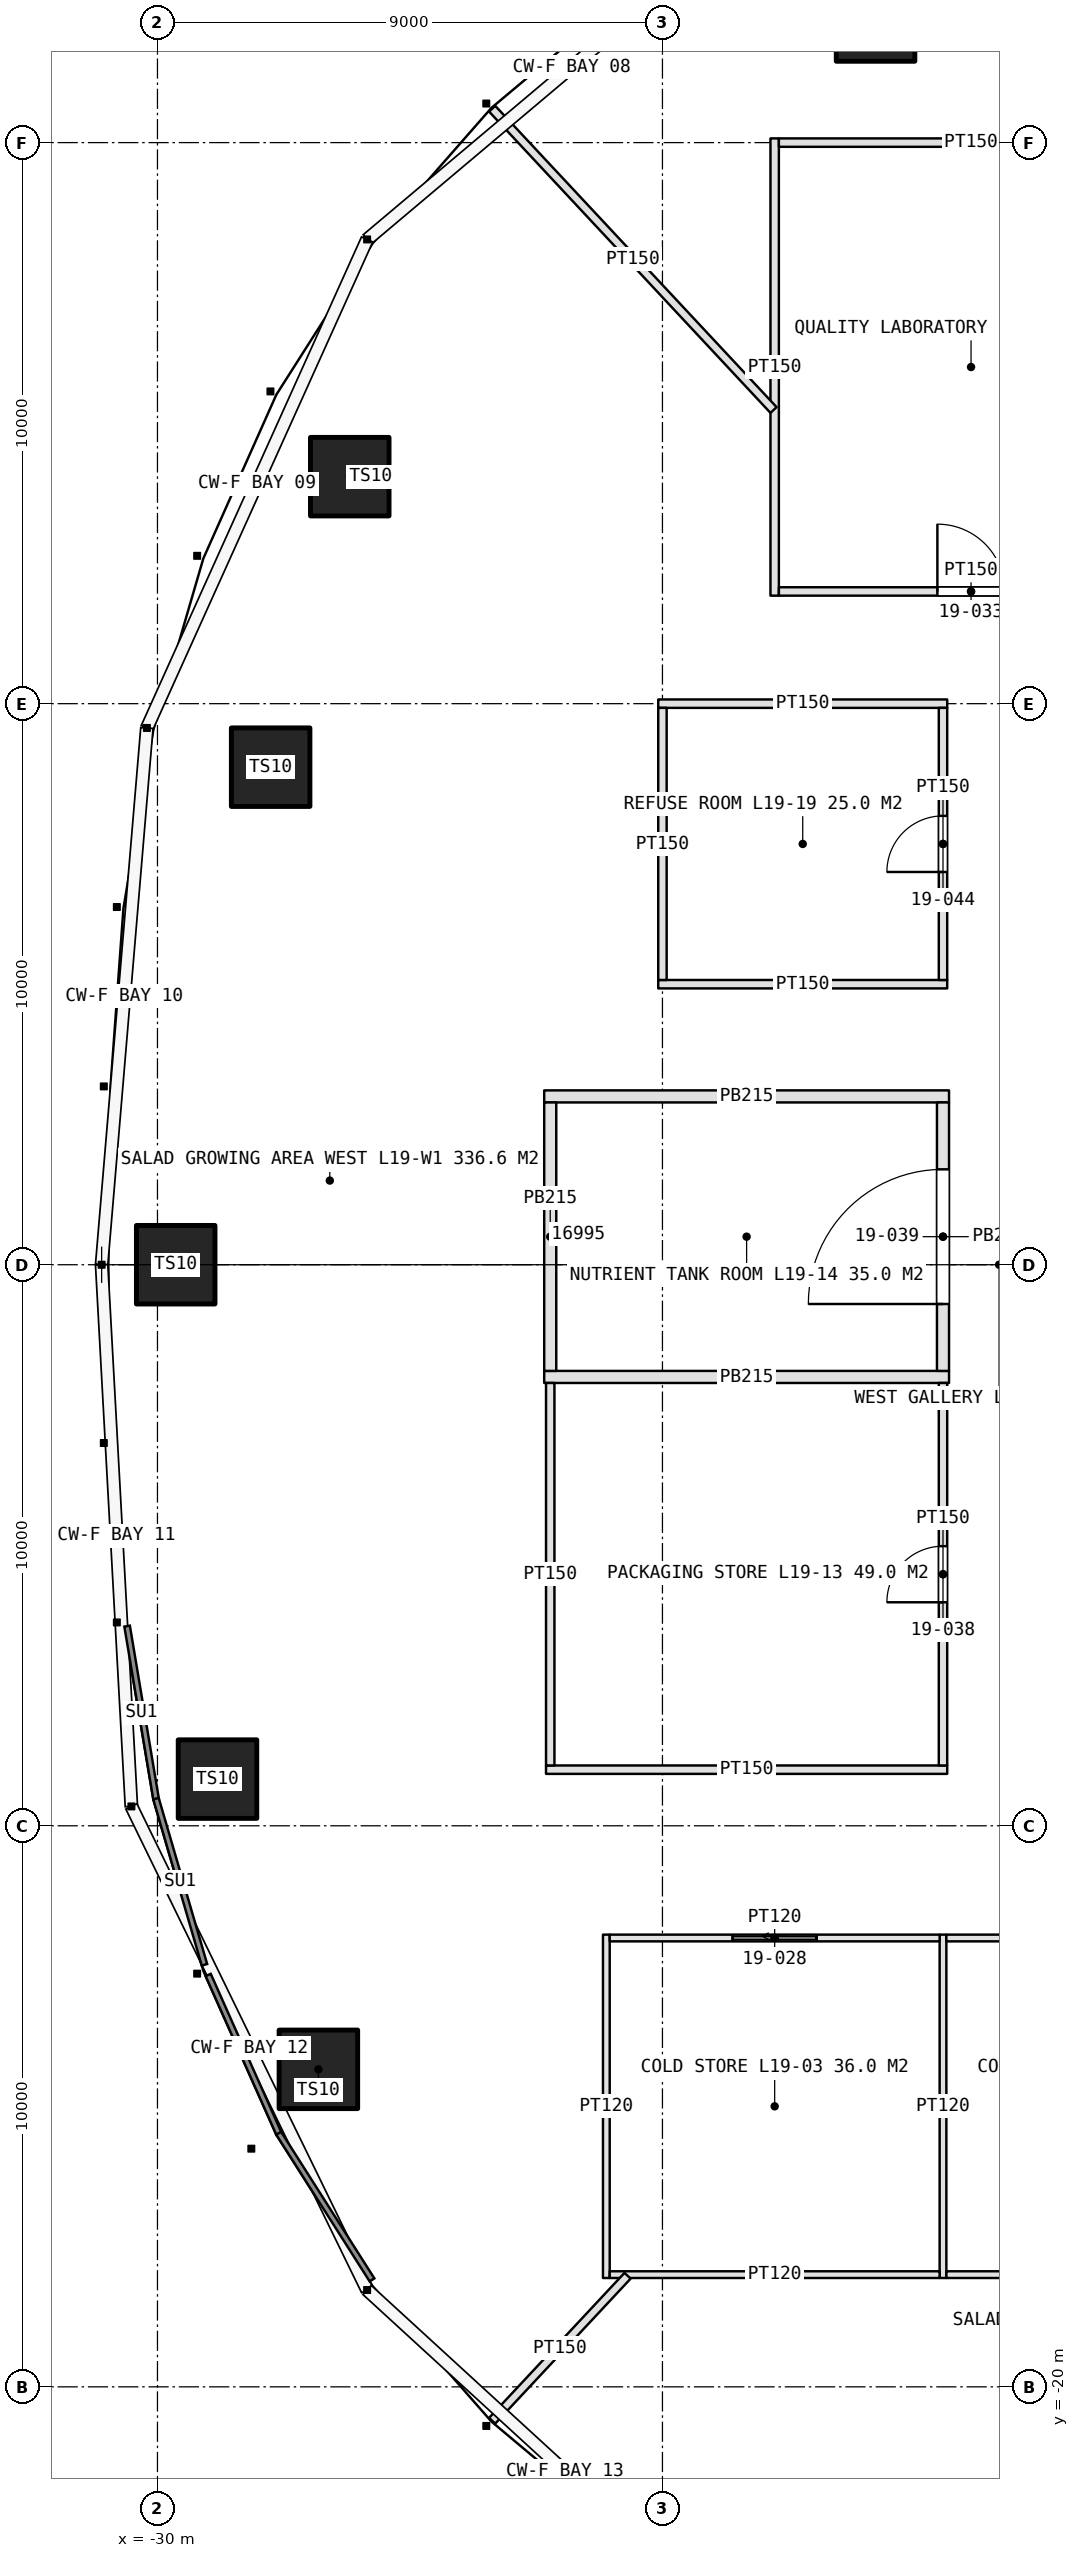
"""IFC4 building model, lengths in metres.
Left out: names, types, materials, properties, quantities, classifications, styles, units other than length and angle.
Written with IfcOpenShell. Run it as: python <this file> out.ifc"""

import sys

from ifc_helpers import new_model, si_unit, direction, frame, frame_2d, origin, origin_2d, place, context, subcontext, project, spatial, rectangle, hollow_rectangle, extrude, element, fill, save


model = new_model("IFC4")
c1 = context("Model", 3, precision=1e-05, world=origin(), true_north=direction((0.0, 1.0)))
c2 = subcontext(c1, "Body", "Model", "MODEL_VIEW")
j1 = project(units=[si_unit("LENGTHUNIT", "METRE"), si_unit("PLANEANGLEUNIT", "RADIAN")], contexts=[c1])
p1 = place(None, origin())
s1 = spatial("IfcSite", under=j1, at=p1, CompositionType="ELEMENT")
p2 = place(p1, origin())
s2 = spatial("IfcBuilding", under=s1, at=p2, CompositionType="ELEMENT")
p3 = place(p2, frame((0.0, 0.0, 95.0)))
s3 = spatial("IfcBuildingStorey", under=s2, at=p3, CompositionType="ELEMENT", Elevation=95.0)
for number, where, z_axis, x_axis in (
    (1, (-17.202, 22.15, 0.0), (0.0, 0.0, 1.0), (1.0, 0.0, 0.0)),
    (2, (-26.573, 14.046, 0.0), (0.0, 0.0, 1.0), (1.0, 0.0, 0.0)),
    (3, (-27.983, 8.868, 0.0), (0.0, 0.0, 1.0), (1.0, 0.0, 0.0)),
):
    element("IfcColumn", number, at=place(p3, frame(where, z_axis=z_axis, x_axis=x_axis)), inside=s3, PredefinedType="COLUMN", context=c2, shape_type="SweptSolid", body=[
        extrude(hollow_rectangle(XDim=1.4, YDim=1.4, WallThickness=0.15, at=origin_2d()), origin(), (0.0, 0.0, 1.0), 5.0),
    ])
for number, where, z_axis, x_axis in (
    (4, (-29.675, 0.0, 0.0), (0.0, 0.0, 1.0), (1.0, 0.0, 0.0)),
    (5, (-28.93, -9.168, 0.0), (0.0, 0.0, 1.0), (1.0, 0.0, 0.0)),
    (6, (-27.132, -14.341, 0.0), (0.0, 0.0, 1.0), (1.0, 0.0, 0.0)),
):
    element("IfcColumn", number, at=place(p3, frame(where, z_axis=z_axis, x_axis=x_axis)), inside=s3, PredefinedType="COLUMN", context=c2, shape_type="SweptSolid", body=[
        extrude(hollow_rectangle(XDim=1.4, YDim=1.4, WallThickness=0.15, at=origin_2d()), origin(), (0.0, 0.0, 1.0), 4.025),
    ])
for number, where, z_axis, x_axis in (
    (7, (-22.0, -11.94, 0.0), (0.0, 0.0, 1.0), (0.0, -1.0, 0.0)),
    (8, (-16.0, -11.94, 0.0), (0.0, 0.0, 1.0), (0.0, -1.0, 0.0)),
):
    element("IfcWall", number, at=place(p3, frame(where, z_axis=z_axis, x_axis=x_axis)), inside=s3, PredefinedType="PARTITIONING", context=c2, shape_type="SweptSolid", body=[
        extrude(rectangle(XDim=6.12, YDim=0.12, at=frame_2d((3.06, 0.0))), origin(), (0.0, 0.0, 1.0), 3.6),
    ])
p4 = place(p3, frame((-21.94, -12.0, 0.0), z_axis=(0.0, 0.0, 1.0), x_axis=(1.0, 0.0, 0.0)))
e9 = element("IfcWall", 9, at=p4, inside=s3, PredefinedType="PARTITIONING", context=c2, shape_type="SweptSolid", body=[
    extrude(rectangle(XDim=5.88, YDim=0.12, at=frame_2d((2.94, 0.0))), origin(), (0.0, 0.0, 1.0), 3.6),
])
p5 = place(p4, frame((2.19, 0.0, 0.0)))
e10 = element("IfcOpeningElement", 10, at=p5, cuts=e9, PredefinedType="OPENING", context=c2, shape_type="SweptSolid", body=[
    extrude(rectangle(XDim=1.5, YDim=2.5, at=frame_2d((0.75, 1.25))), frame((0.0, 0.07, 0.0), z_axis=(0.0, -1.0, 0.0), x_axis=(1.0, 0.0, 0.0)), (0.0, 0.0, 1.0), 0.14),
])
p6 = place(p3, frame((-21.94, -18.0, 0.0), z_axis=(0.0, 0.0, 1.0), x_axis=(1.0, 0.0, 0.0)))
e11 = element("IfcWall", 11, at=p6, inside=s3, PredefinedType="PARTITIONING", context=c2, shape_type="SweptSolid", body=[
    extrude(rectangle(XDim=5.88, YDim=0.12, at=frame_2d((2.94, 0.0))), origin(), (0.0, 0.0, 1.0), 3.6),
])
p7 = place(p3, frame((-15.94, -12.0, 0.0), z_axis=(0.0, 0.0, 1.0), x_axis=(1.0, 0.0, 0.0)))
e12 = element("IfcWall", 12, at=p7, inside=s3, PredefinedType="PARTITIONING", context=c2, shape_type="SweptSolid", body=[
    extrude(rectangle(XDim=5.88, YDim=0.12, at=frame_2d((2.94, 0.0))), origin(), (0.0, 0.0, 1.0), 3.6),
])
p8 = place(p7, frame((2.19, 0.0, 0.0)))
e13 = element("IfcOpeningElement", 13, at=p8, cuts=e12, PredefinedType="OPENING", context=c2, shape_type="SweptSolid", body=[
    extrude(rectangle(XDim=1.5, YDim=2.5, at=frame_2d((0.75, 1.25))), frame((0.0, 0.07, 0.0), z_axis=(0.0, -1.0, 0.0), x_axis=(1.0, 0.0, 0.0)), (0.0, 0.0, 1.0), 0.14),
])
p9 = place(p3, frame((-15.94, -18.0, 0.0), z_axis=(0.0, 0.0, 1.0), x_axis=(1.0, 0.0, 0.0)))
e14 = element("IfcWall", 14, at=p9, inside=s3, PredefinedType="PARTITIONING", context=c2, shape_type="SweptSolid", body=[
    extrude(rectangle(XDim=5.88, YDim=0.12, at=frame_2d((2.94, 0.0))), origin(), (0.0, 0.0, 1.0), 3.6),
])
p10 = place(p3, frame((-19.0, 11.925, 0.0), z_axis=(0.0, 0.0, 1.0), x_axis=(0.0, 1.0, 0.0)))
e15 = element("IfcWall", 15, at=p10, inside=s3, PredefinedType="PARTITIONING", context=c2, shape_type="SweptSolid", body=[
    extrude(rectangle(XDim=8.15, YDim=0.15, at=frame_2d((4.075, 0.0))), origin(), (0.0, 0.0, 1.0), 3.6),
])
p11 = place(p3, frame((-18.925, 12.0, 0.0), z_axis=(0.0, 0.0, 1.0), x_axis=(1.0, 0.0, 0.0)))
e16 = element("IfcWall", 16, at=p11, inside=s3, PredefinedType="PARTITIONING", context=c2, shape_type="SweptSolid", body=[
    extrude(rectangle(XDim=6.85, YDim=0.15, at=frame_2d((3.425, 0.0))), origin(), (0.0, 0.0, 1.0), 3.6),
])
p12 = place(p11, frame((2.825, 0.0, 0.0)))
e17 = element("IfcOpeningElement", 17, at=p12, cuts=e16, PredefinedType="OPENING", context=c2, shape_type="SweptSolid", body=[
    extrude(rectangle(XDim=1.2, YDim=2.3, at=frame_2d((0.6, 1.15))), frame((0.0, 0.085, 0.0), z_axis=(0.0, -1.0, 0.0), x_axis=(1.0, 0.0, 0.0)), (0.0, 0.0, 1.0), 0.17),
])
p13 = place(p3, frame((-18.925, 20.0, 0.0), z_axis=(0.0, 0.0, 1.0), x_axis=(1.0, 0.0, 0.0)))
e18 = element("IfcWall", 18, at=p13, inside=s3, PredefinedType="PARTITIONING", context=c2, shape_type="SweptSolid", body=[
    extrude(rectangle(XDim=6.85, YDim=0.15, at=frame_2d((3.425, 0.0))), origin(), (0.0, 0.0, 1.0), 3.6),
])
p14 = place(p3, frame((-15.925, -9.0, 0.0), z_axis=(0.0, 0.0, 1.0), x_axis=(-1.0, 0.0, 0.0)))
e19 = element("IfcWall", 19, at=p14, inside=s3, PredefinedType="PARTITIONING", context=c2, shape_type="SweptSolid", body=[
    extrude(rectangle(XDim=7.15, YDim=0.15, at=frame_2d((3.575, 0.0))), origin(), (0.0, 0.0, 1.0), 3.6),
])
for number, where, z_axis, x_axis in (
    (20, (-15.893, -2.0, 0.0), (0.0, 0.0, 1.0), (-1.0, 0.0, 0.0)),
    (21, (-15.893, 3.0, 0.0), (0.0, 0.0, 1.0), (-1.0, 0.0, 0.0)),
):
    element("IfcWall", number, at=place(p3, frame(where, z_axis=z_axis, x_axis=x_axis)), inside=s3, PredefinedType="PARTITIONING", context=c2, shape_type="SweptSolid", body=[
        extrude(rectangle(XDim=7.215, YDim=0.215, at=frame_2d((3.607, 0.0))), origin(), (0.0, 0.0, 1.0), 3.6),
    ])
p15 = place(p3, frame((-16.0, -8.925, 0.0), z_axis=(0.0, 0.0, 1.0), x_axis=(0.0, 1.0, 0.0)))
e22 = element("IfcWall", 22, at=p15, inside=s3, PredefinedType="PARTITIONING", context=c2, shape_type="SweptSolid", body=[
    extrude(rectangle(XDim=6.818, YDim=0.15, at=frame_2d((3.409, 0.0))), origin(), (0.0, 0.0, 1.0), 3.6),
])
p16 = place(p15, frame((2.909, 0.0, 0.0)))
e23 = element("IfcOpeningElement", 23, at=p16, cuts=e22, PredefinedType="OPENING", context=c2, shape_type="SweptSolid", body=[
    extrude(rectangle(XDim=1.0, YDim=2.2, at=frame_2d((0.5, 1.1))), frame((0.0, 0.085, 0.0), z_axis=(0.0, -1.0, 0.0), x_axis=(1.0, 0.0, 0.0)), (0.0, 0.0, 1.0), 0.17),
])
p17 = place(p3, frame((-23.0, -8.925, 0.0), z_axis=(0.0, 0.0, 1.0), x_axis=(0.0, 1.0, 0.0)))
e24 = element("IfcWall", 24, at=p17, inside=s3, PredefinedType="PARTITIONING", context=c2, shape_type="SweptSolid", body=[
    extrude(rectangle(XDim=6.818, YDim=0.15, at=frame_2d((3.409, 0.0))), origin(), (0.0, 0.0, 1.0), 3.6),
])
p18 = place(p3, frame((-16.0, -1.893, 0.0), z_axis=(0.0, 0.0, 1.0), x_axis=(0.0, 1.0, 0.0)))
e25 = element("IfcWall", 25, at=p18, inside=s3, PredefinedType="PARTITIONING", context=c2, shape_type="SweptSolid", body=[
    extrude(rectangle(XDim=4.785, YDim=0.215, at=frame_2d((2.393, 0.0))), origin(), (0.0, 0.0, 1.0), 3.6),
])
p19 = place(p18, frame((1.192, 0.0, 0.0)))
e26 = element("IfcOpeningElement", 26, at=p19, cuts=e25, PredefinedType="OPENING", context=c2, shape_type="SweptSolid", body=[
    extrude(rectangle(XDim=2.4, YDim=2.4, at=frame_2d((1.2, 1.2))), frame((0.0, 0.118, 0.0), z_axis=(0.0, -1.0, 0.0), x_axis=(1.0, 0.0, 0.0)), (0.0, 0.0, 1.0), 0.235),
])
p20 = place(p3, frame((-23.0, -1.893, 0.0), z_axis=(0.0, 0.0, 1.0), x_axis=(0.0, 1.0, 0.0)))
e27 = element("IfcWall", 27, at=p20, inside=s3, PredefinedType="PARTITIONING", context=c2, shape_type="SweptSolid", body=[
    extrude(rectangle(XDim=4.785, YDim=0.215, at=frame_2d((2.393, 0.0))), origin(), (0.0, 0.0, 1.0), 3.6),
])
for number, where, z_axis, x_axis in (
    (28, (-15.925, 5.0, 0.0), (0.0, 0.0, 1.0), (-1.0, 0.0, 0.0)),
    (29, (-15.925, 10.0, 0.0), (0.0, 0.0, 1.0), (-1.0, 0.0, 0.0)),
):
    element("IfcWall", number, at=place(p3, frame(where, z_axis=z_axis, x_axis=x_axis)), inside=s3, PredefinedType="PARTITIONING", context=c2, shape_type="SweptSolid", body=[
        extrude(rectangle(XDim=5.15, YDim=0.15, at=frame_2d((2.575, 0.0))), origin(), (0.0, 0.0, 1.0), 3.6),
    ])
p21 = place(p3, frame((-16.0, 5.075, 0.0), z_axis=(0.0, 0.0, 1.0), x_axis=(0.0, 1.0, 0.0)))
e30 = element("IfcWall", 30, at=p21, inside=s3, PredefinedType="PARTITIONING", context=c2, shape_type="SweptSolid", body=[
    extrude(rectangle(XDim=4.85, YDim=0.15, at=frame_2d((2.425, 0.0))), origin(), (0.0, 0.0, 1.0), 3.6),
])
p22 = place(p21, frame((1.925, 0.0, 0.0)))
e31 = element("IfcOpeningElement", 31, at=p22, cuts=e30, PredefinedType="OPENING", context=c2, shape_type="SweptSolid", body=[
    extrude(rectangle(XDim=1.0, YDim=2.2, at=frame_2d((0.5, 1.1))), frame((0.0, 0.085, 0.0), z_axis=(0.0, -1.0, 0.0), x_axis=(1.0, 0.0, 0.0)), (0.0, 0.0, 1.0), 0.17),
])
p23 = place(p3, frame((-21.0, 5.075, 0.0), z_axis=(0.0, 0.0, 1.0), x_axis=(0.0, 1.0, 0.0)))
e32 = element("IfcWall", 32, at=p23, inside=s3, PredefinedType="PARTITIONING", context=c2, shape_type="SweptSolid", body=[
    extrude(rectangle(XDim=4.85, YDim=0.15, at=frame_2d((2.425, 0.0))), origin(), (0.0, 0.0, 1.0), 3.6),
])
p24 = place(p3, frame((-21.622, -18.02, 0.0), z_axis=(0.0, 0.0, 1.0), x_axis=(-0.682522451791, -0.730864626864, 0.0)))
e33 = element("IfcWall", 33, at=p24, inside=s3, PredefinedType="PARTITIONING", context=c2, shape_type="SweptSolid", body=[
    extrude(rectangle(XDim=3.535, YDim=0.15, at=frame_2d((1.768, 0.0))), origin(), (0.0, 0.0, 1.0), 3.6),
])
p25 = place(p3, frame((-19.02, 15.234, 0.0), z_axis=(0.0, 0.0, 1.0), x_axis=(-0.682519491562, 0.730867391281, 0.0)))
e34 = element("IfcWall", 34, at=p25, inside=s3, PredefinedType="PARTITIONING", context=c2, shape_type="SweptSolid", body=[
    extrude(rectangle(XDim=7.347, YDim=0.15, at=frame_2d((3.674, 0.0))), origin(), (0.0, 0.0, 1.0), 3.6),
])
p26 = place(p5, origin())
e35 = element("IfcDoor", 35, at=p26, inside=s3, OperationType="SLIDING_TO_LEFT", PredefinedType="DOOR", context=c2, shape_type="SweptSolid", body=[
    extrude(rectangle(XDim=1.5, YDim=2.5, at=frame_2d((0.75, 1.25))), frame((0.0, 0.025, 0.0), z_axis=(0.0, -1.0, 0.0), x_axis=(1.0, 0.0, 0.0)), (0.0, 0.0, 1.0), 0.05),
])
fill(e10, e35)
p27 = place(p12, origin())
e36 = element("IfcDoor", 36, at=p27, inside=s3, OperationType="SINGLE_SWING_LEFT", PredefinedType="DOOR", context=c2, shape_type="SweptSolid", body=[
    extrude(rectangle(XDim=1.2, YDim=2.3, at=frame_2d((0.6, 1.15))), frame((0.0, 0.025, 0.0), z_axis=(0.0, -1.0, 0.0), x_axis=(1.0, 0.0, 0.0)), (0.0, 0.0, 1.0), 0.05),
])
fill(e17, e36)
p28 = place(p16, origin())
e37 = element("IfcDoor", 37, at=p28, inside=s3, OperationType="SINGLE_SWING_LEFT", PredefinedType="DOOR", context=c2, shape_type="SweptSolid", body=[
    extrude(rectangle(XDim=1.0, YDim=2.2, at=frame_2d((0.5, 1.1))), frame((0.0, 0.025, 0.0), z_axis=(0.0, -1.0, 0.0), x_axis=(1.0, 0.0, 0.0)), (0.0, 0.0, 1.0), 0.05),
])
fill(e23, e37)
p29 = place(p19, origin())
e38 = element("IfcDoor", 38, at=p29, inside=s3, OperationType="DOUBLE_DOOR_SINGLE_SWING", PredefinedType="DOOR", context=c2, shape_type="SweptSolid", body=[
    extrude(rectangle(XDim=2.4, YDim=2.4, at=frame_2d((1.2, 1.2))), frame((0.0, 0.025, 0.0), z_axis=(0.0, -1.0, 0.0), x_axis=(1.0, 0.0, 0.0)), (0.0, 0.0, 1.0), 0.05),
])
fill(e26, e38)
p30 = place(p22, origin())
e39 = element("IfcDoor", 39, at=p30, inside=s3, OperationType="SINGLE_SWING_LEFT", PredefinedType="DOOR", context=c2, shape_type="SweptSolid", body=[
    extrude(rectangle(XDim=1.0, YDim=2.2, at=frame_2d((0.5, 1.1))), frame((0.0, 0.025, 0.0), z_axis=(0.0, -1.0, 0.0), x_axis=(1.0, 0.0, 0.0)), (0.0, 0.0, 1.0), 0.05),
])
fill(e31, e39)
save(model, sys.argv[1])
